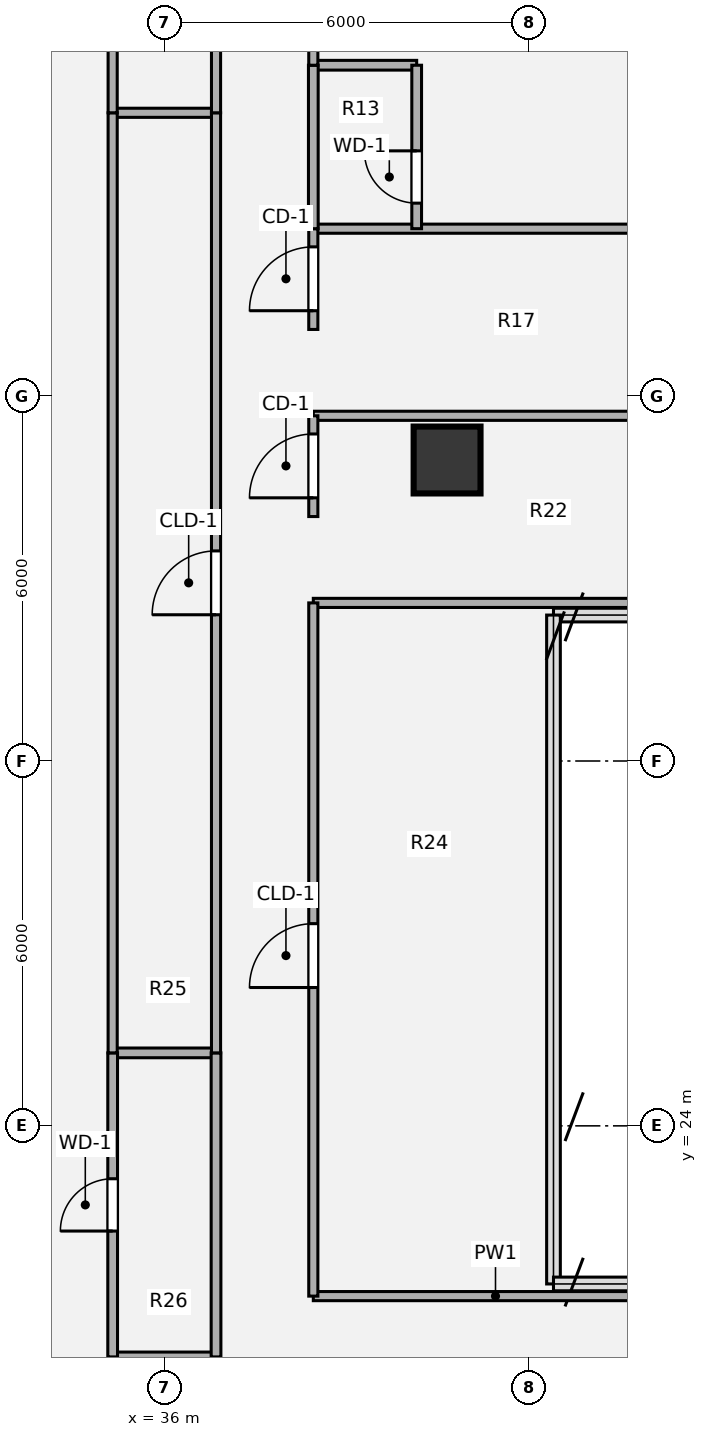
"""IFC4 building model, lengths in metres.
Left out: names, types, materials, properties, quantities, classifications, styles, units other than length and angle.
Written with IfcOpenShell. Run it as: python <this file> out.ifc"""

import sys

from ifc_helpers import new_model, si_unit, direction, frame, frame_2d, origin, origin_2d, place, context, subcontext, project, spatial, rectangle, hollow_circle, extrude, source, transform, mapped, element, fill, save


model = new_model("IFC4")
c1 = context("Model", 3, precision=1e-05, world=origin(), true_north=direction((0.0, 1.0)))
c2 = subcontext(c1, "Body", "Model", "MODEL_VIEW")
j1 = project(units=[si_unit("LENGTHUNIT", "METRE"), si_unit("PLANEANGLEUNIT", "RADIAN")], contexts=[c1])
p1 = place(None, origin())
s1 = spatial("IfcSite", under=j1, at=p1, CompositionType="ELEMENT")
p2 = place(p1, origin())
s2 = spatial("IfcBuilding", under=s1, at=p2, CompositionType="ELEMENT")
p3 = place(p2, frame((0.0, 0.0, 171.54)))
s3 = spatial("IfcBuildingStorey", under=s2, at=p3, CompositionType="ELEMENT", Elevation=171.54)
m1 = source(origin(), c2, "Body", "SweptSolid", [
    extrude(hollow_circle(Radius=0.55, WallThickness=0.04, at=origin_2d()), origin(), (0.0, 0.0, 1.0), 3.78),
])
p4 = place(p3, frame((40.65, 34.95, 0.0), z_axis=(0.0, 0.0, 1.0), x_axis=(1.0, 0.0, 0.0)))
e1 = element("IfcColumn", 1, at=p4, inside=s3, PredefinedType="COLUMN", context=c2, shape_type="MappedRepresentation", body=[
    mapped(m1, transform((0.0, 0.0, 0.0), x_axis=(1.0, 0.0, 0.0), y_axis=(0.0, 1.0, 0.0), z_axis=(0.0, 0.0, 1.0), scale=1.0)),
])
p5 = place(p3, frame((35.15, 20.2, 0.0), z_axis=(0.0, 0.0, 1.0), x_axis=(1.0, 0.0, 0.0)))
e2 = element("IfcWall", 2, at=p5, inside=s3, PredefinedType="PLUMBINGWALL", context=c2, shape_type="SweptSolid", body=[
    extrude(rectangle(XDim=1.7, YDim=0.16, at=frame_2d((0.85, 0.0))), origin(), (0.0, 0.0, 1.0), 3.5),
])
p6 = place(p3, frame((38.45, 21.2, 0.0), z_axis=(0.0, 0.0, 1.0), x_axis=(1.0, 0.0, 0.0)))
e3 = element("IfcWall", 3, at=p6, inside=s3, PredefinedType="PARTITIONING", context=c2, shape_type="SweptSolid", body=[
    extrude(rectangle(XDim=5.993, YDim=0.15, at=frame_2d((2.996, 0.0))), origin(), (0.0, 0.0, 1.0), 3.5),
])
p7 = place(p3, frame((35.15, 25.2, 0.0), z_axis=(0.0, 0.0, 1.0), x_axis=(1.0, 0.0, 0.0)))
e4 = element("IfcWall", 4, at=p7, inside=s3, PredefinedType="PLUMBINGWALL", context=c2, shape_type="SweptSolid", body=[
    extrude(rectangle(XDim=1.7, YDim=0.16, at=frame_2d((0.85, 0.0))), origin(), (0.0, 0.0, 1.0), 3.5),
])
p8 = place(p3, frame((38.45, 32.6, 0.0), z_axis=(0.0, 0.0, 1.0), x_axis=(1.0, 0.0, 0.0)))
e5 = element("IfcWall", 5, at=p8, inside=s3, PredefinedType="PARTITIONING", context=c2, shape_type="SweptSolid", body=[
    extrude(rectangle(XDim=5.993, YDim=0.15, at=frame_2d((2.997, 0.0))), origin(), (0.0, 0.0, 1.0), 3.5),
])
for number, where, z_axis, x_axis in (
    (6, (38.45, 35.677, 0.0), (0.0, 0.0, 1.0), (1.0, 0.0, 0.0)),
    (7, (38.45, 38.754, 0.0), (0.0, 0.0, 1.0), (1.0, 0.0, 0.0)),
):
    element("IfcWall", number, at=place(p3, frame(where, z_axis=z_axis, x_axis=x_axis)), inside=s3, PredefinedType="PARTITIONING", context=c2, shape_type="SweptSolid", body=[
        extrude(rectangle(XDim=6.2, YDim=0.15, at=frame_2d((3.1, 0.0))), origin(), (0.0, 0.0, 1.0), 2.982),
    ])
p9 = place(p3, frame((35.15, 40.66, 0.0), z_axis=(0.0, 0.0, 1.0), x_axis=(1.0, 0.0, 0.0)))
e8 = element("IfcWall", 8, at=p9, inside=s3, PredefinedType="PARTITIONING", context=c2, shape_type="SweptSolid", body=[
    extrude(rectangle(XDim=1.7, YDim=0.15, at=frame_2d((0.85, 0.0))), origin(), (0.0, 0.0, 1.0), 3.259),
])
p10 = place(p3, frame((38.45, 41.442, 0.0), z_axis=(0.0, 0.0, 1.0), x_axis=(1.0, 0.0, 0.0)))
e9 = element("IfcWall", 9, at=p10, inside=s3, PredefinedType="PLUMBINGWALL", context=c2, shape_type="SweptSolid", body=[
    extrude(rectangle(XDim=1.7, YDim=0.16, at=frame_2d((0.85, 0.0))), origin(), (0.0, 0.0, 1.0), 3.259),
])
p11 = place(p3, frame((35.15, 20.2, 0.0), z_axis=(0.0, 0.0, 1.0), x_axis=(0.0, 1.0, 0.0)))
e10 = element("IfcWall", 10, at=p11, inside=s3, PredefinedType="PLUMBINGWALL", context=c2, shape_type="SweptSolid", body=[
    extrude(rectangle(XDim=5.0, YDim=0.16, at=frame_2d((2.5, 0.0))), origin(), (0.0, 0.0, 1.0), 3.5),
])
p12 = place(p11, frame((2.07, 0.0, 0.0)))
e11 = element("IfcOpeningElement", 11, at=p12, cuts=e10, PredefinedType="OPENING", context=c2, shape_type="SweptSolid", body=[
    extrude(rectangle(XDim=0.86, YDim=2.1, at=origin_2d()), frame((0.43, 0.09, 1.05), z_axis=(0.0, -1.0, 0.0), x_axis=(1.0, 0.0, 0.0)), (0.0, 0.0, 1.0), 0.18),
])
p13 = place(p3, frame((35.15, 25.2, 0.0), z_axis=(0.0, 0.0, 1.0), x_axis=(0.0, 1.0, 0.0)))
e12 = element("IfcWall", 12, at=p13, inside=s3, PredefinedType="PARTITIONING", context=c2, shape_type="SweptSolid", body=[
    extrude(rectangle(XDim=15.46, YDim=0.15, at=frame_2d((7.73, 0.0))), origin(), (0.0, 0.0, 1.0), 3.5),
])
p14 = place(p3, frame((35.15, 40.66, 0.0), z_axis=(0.0, 0.0, 1.0), x_axis=(0.0, 1.0, 0.0)))
e13 = element("IfcWall", 13, at=p14, inside=s3, PredefinedType="PARTITIONING", context=c2, shape_type="SweptSolid", body=[
    extrude(rectangle(XDim=10.54, YDim=0.15, at=frame_2d((5.27, 0.0))), origin(), (0.0, 0.0, 1.0), 3.5),
])
p15 = place(p14, frame((4.81, 0.0, 0.0)))
e14 = element("IfcOpeningElement", 14, at=p15, cuts=e13, PredefinedType="OPENING", context=c2, shape_type="SweptSolid", body=[
    extrude(rectangle(XDim=0.86, YDim=2.1, at=origin_2d()), frame((0.43, 0.085, 1.05), z_axis=(0.0, -1.0, 0.0), x_axis=(1.0, 0.0, 0.0)), (0.0, 0.0, 1.0), 0.17),
])
p16 = place(p3, frame((36.85, 20.2, 0.0), z_axis=(0.0, 0.0, 1.0), x_axis=(0.0, 1.0, 0.0)))
e15 = element("IfcWall", 15, at=p16, inside=s3, PredefinedType="PLUMBINGWALL", context=c2, shape_type="SweptSolid", body=[
    extrude(rectangle(XDim=5.0, YDim=0.16, at=frame_2d((2.5, 0.0))), origin(), (0.0, 0.0, 1.0), 3.5),
])
p17 = place(p3, frame((36.85, 25.2, 0.0), z_axis=(0.0, 0.0, 1.0), x_axis=(0.0, 1.0, 0.0)))
e16 = element("IfcWall", 16, at=p17, inside=s3, PredefinedType="PARTITIONING", context=c2, shape_type="SweptSolid", body=[
    extrude(rectangle(XDim=15.46, YDim=0.15, at=frame_2d((7.73, 0.0))), origin(), (0.0, 0.0, 1.0), 3.5),
])
p18 = place(p17, frame((7.205, 0.0, 0.0)))
e17 = element("IfcOpeningElement", 17, at=p18, cuts=e16, PredefinedType="OPENING", context=c2, shape_type="SweptSolid", body=[
    extrude(rectangle(XDim=1.05, YDim=2.1, at=origin_2d()), frame((0.525, 0.085, 1.05), z_axis=(0.0, -1.0, 0.0), x_axis=(1.0, 0.0, 0.0)), (0.0, 0.0, 1.0), 0.17),
])
p19 = place(p3, frame((36.85, 40.66, 0.0), z_axis=(0.0, 0.0, 1.0), x_axis=(0.0, 1.0, 0.0)))
e18 = element("IfcWall", 18, at=p19, inside=s3, PredefinedType="PARTITIONING", context=c2, shape_type="SweptSolid", body=[
    extrude(rectangle(XDim=10.54, YDim=0.15, at=frame_2d((5.27, 0.0))), origin(), (0.0, 0.0, 1.0), 3.5),
])
p20 = place(p3, frame((38.45, 21.2, 0.0), z_axis=(0.0, 0.0, 1.0), x_axis=(0.0, 1.0, 0.0)))
e19 = element("IfcWall", 19, at=p20, inside=s3, PredefinedType="PARTITIONING", context=c2, shape_type="SweptSolid", body=[
    extrude(rectangle(XDim=11.4, YDim=0.15, at=frame_2d((5.7, 0.0))), origin(), (0.0, 0.0, 1.0), 3.5),
])
p21 = place(p20, frame((5.075, 0.0, 0.0)))
e20 = element("IfcOpeningElement", 20, at=p21, cuts=e19, PredefinedType="OPENING", context=c2, shape_type="SweptSolid", body=[
    extrude(rectangle(XDim=1.05, YDim=2.1, at=origin_2d()), frame((0.525, 0.085, 1.05), z_axis=(0.0, -1.0, 0.0), x_axis=(1.0, 0.0, 0.0)), (0.0, 0.0, 1.0), 0.17),
])
p22 = place(p3, frame((38.45, 34.02, 0.0), z_axis=(0.0, 0.0, 1.0), x_axis=(0.0, 1.0, 0.0)))
e21 = element("IfcWall", 21, at=p22, inside=s3, PredefinedType="PARTITIONING", context=c2, shape_type="SweptSolid", body=[
    extrude(rectangle(XDim=1.657, YDim=0.15, at=frame_2d((0.829, 0.0))), origin(), (0.0, 0.0, 1.0), 3.5),
])
p23 = place(p22, frame((0.308, 0.0, 0.0)))
e22 = element("IfcOpeningElement", 22, at=p23, cuts=e21, PredefinedType="OPENING", context=c2, shape_type="SweptSolid", body=[
    extrude(rectangle(XDim=1.05, YDim=2.1, at=origin_2d()), frame((0.525, 0.085, 1.05), z_axis=(0.0, -1.0, 0.0), x_axis=(1.0, 0.0, 0.0)), (0.0, 0.0, 1.0), 0.17),
])
p24 = place(p3, frame((38.45, 37.097, 0.0), z_axis=(0.0, 0.0, 1.0), x_axis=(0.0, 1.0, 0.0)))
e23 = element("IfcWall", 23, at=p24, inside=s3, PredefinedType="PARTITIONING", context=c2, shape_type="SweptSolid", body=[
    extrude(rectangle(XDim=1.657, YDim=0.15, at=frame_2d((0.829, 0.0))), origin(), (0.0, 0.0, 1.0), 3.5),
])
p25 = place(p24, frame((0.308, 0.0, 0.0)))
e24 = element("IfcOpeningElement", 24, at=p25, cuts=e23, PredefinedType="OPENING", context=c2, shape_type="SweptSolid", body=[
    extrude(rectangle(XDim=1.05, YDim=2.1, at=origin_2d()), frame((0.525, 0.085, 1.05), z_axis=(0.0, -1.0, 0.0), x_axis=(1.0, 0.0, 0.0)), (0.0, 0.0, 1.0), 0.17),
])
p26 = place(p3, frame((38.45, 38.754, 0.0), z_axis=(0.0, 0.0, 1.0), x_axis=(0.0, 1.0, 0.0)))
e25 = element("IfcWall", 25, at=p26, inside=s3, PredefinedType="PLUMBINGWALL", context=c2, shape_type="SweptSolid", body=[
    extrude(rectangle(XDim=2.688, YDim=0.16, at=frame_2d((1.344, 0.0))), origin(), (0.0, 0.0, 1.0), 3.5),
])
p27 = place(p3, frame((38.45, 41.442, 0.0), z_axis=(0.0, 0.0, 1.0), x_axis=(0.0, 1.0, 0.0)))
e26 = element("IfcWall", 26, at=p27, inside=s3, PredefinedType="PARTITIONING", context=c2, shape_type="SweptSolid", body=[
    extrude(rectangle(XDim=3.285, YDim=0.15, at=frame_2d((1.643, 0.0))), origin(), (0.0, 0.0, 1.0), 3.5),
])
p28 = place(p27, frame((1.122, 0.0, 0.0)))
e27 = element("IfcOpeningElement", 27, at=p28, cuts=e26, PredefinedType="OPENING", context=c2, shape_type="SweptSolid", body=[
    extrude(rectangle(XDim=1.05, YDim=2.1, at=origin_2d()), frame((0.525, 0.085, 1.05), z_axis=(0.0, -1.0, 0.0), x_axis=(1.0, 0.0, 0.0)), (0.0, 0.0, 1.0), 0.17),
])
p29 = place(p3, frame((40.15, 38.754, 0.0), z_axis=(0.0, 0.0, 1.0), x_axis=(0.0, 1.0, 0.0)))
e28 = element("IfcWall", 28, at=p29, inside=s3, PredefinedType="PLUMBINGWALL", context=c2, shape_type="SweptSolid", body=[
    extrude(rectangle(XDim=2.688, YDim=0.16, at=frame_2d((1.344, 0.0))), origin(), (0.0, 0.0, 1.0), 3.5),
])
p30 = place(p29, frame((0.42, 0.0, 0.0)))
e29 = element("IfcOpeningElement", 29, at=p30, cuts=e28, PredefinedType="OPENING", context=c2, shape_type="SweptSolid", body=[
    extrude(rectangle(XDim=0.86, YDim=2.1, at=origin_2d()), frame((0.43, 0.09, 1.05), z_axis=(0.0, -1.0, 0.0), x_axis=(1.0, 0.0, 0.0)), (0.0, 0.0, 1.0), 0.18),
])
m2 = source(origin(), c2, "Body", "SweptSolid", [
    extrude(rectangle(XDim=0.86, YDim=2.1, at=origin_2d()), frame((0.43, 0.025, 1.05), z_axis=(0.0, -1.0, 0.0), x_axis=(1.0, 0.0, 0.0)), (0.0, 0.0, 1.0), 0.05),
])
p31 = place(p12, origin())
e30 = element("IfcDoor", 30, at=p31, inside=s3, OperationType="SINGLE_SWING_LEFT", PredefinedType="DOOR", context=c2, shape_type="MappedRepresentation", body=[
    mapped(m2, transform((0.0, 0.0, 0.0), x_axis=(1.0, 0.0, 0.0), y_axis=(0.0, 1.0, 0.0), z_axis=(0.0, 0.0, 1.0), scale=1.0)),
])
fill(e11, e30)
m3 = source(origin(), c2, "Body", "SweptSolid", [
    extrude(rectangle(XDim=1.05, YDim=2.1, at=origin_2d()), frame((0.525, 0.025, 1.05), z_axis=(0.0, -1.0, 0.0), x_axis=(1.0, 0.0, 0.0)), (0.0, 0.0, 1.0), 0.05),
])
p32 = place(p18, origin())
e31 = element("IfcDoor", 31, at=p32, inside=s3, OperationType="SINGLE_SWING_LEFT", PredefinedType="DOOR", context=c2, shape_type="MappedRepresentation", body=[
    mapped(m3, transform((0.0, 0.0, 0.0), x_axis=(1.0, 0.0, 0.0), y_axis=(0.0, 1.0, 0.0), z_axis=(0.0, 0.0, 1.0), scale=1.0)),
])
fill(e17, e31)
p33 = place(p21, origin())
e32 = element("IfcDoor", 32, at=p33, inside=s3, OperationType="SINGLE_SWING_LEFT", PredefinedType="DOOR", context=c2, shape_type="MappedRepresentation", body=[
    mapped(m3, transform((0.0, 0.0, 0.0), x_axis=(1.0, 0.0, 0.0), y_axis=(0.0, 1.0, 0.0), z_axis=(0.0, 0.0, 1.0), scale=1.0)),
])
fill(e20, e32)
m4 = source(origin(), c2, "Body", "SweptSolid", [
    extrude(rectangle(XDim=1.05, YDim=2.1, at=origin_2d()), frame((0.525, 0.025, 1.05), z_axis=(0.0, -1.0, 0.0), x_axis=(1.0, 0.0, 0.0)), (0.0, 0.0, 1.0), 0.05),
])
p34 = place(p23, origin())
e33 = element("IfcDoor", 33, at=p34, inside=s3, OperationType="SINGLE_SWING_LEFT", PredefinedType="DOOR", context=c2, shape_type="MappedRepresentation", body=[
    mapped(m4, transform((0.0, 0.0, 0.0), x_axis=(1.0, 0.0, 0.0), y_axis=(0.0, 1.0, 0.0), z_axis=(0.0, 0.0, 1.0), scale=1.0)),
])
fill(e22, e33)
p35 = place(p25, origin())
e34 = element("IfcDoor", 34, at=p35, inside=s3, OperationType="SINGLE_SWING_LEFT", PredefinedType="DOOR", context=c2, shape_type="MappedRepresentation", body=[
    mapped(m4, transform((0.0, 0.0, 0.0), x_axis=(1.0, 0.0, 0.0), y_axis=(0.0, 1.0, 0.0), z_axis=(0.0, 0.0, 1.0), scale=1.0)),
])
fill(e24, e34)
p36 = place(p30, origin())
e35 = element("IfcDoor", 35, at=p36, inside=s3, OperationType="SINGLE_SWING_RIGHT", PredefinedType="DOOR", context=c2, shape_type="MappedRepresentation", body=[
    mapped(m2, transform((0.0, 0.0, 0.0), x_axis=(1.0, 0.0, 0.0), y_axis=(0.0, 1.0, 0.0), z_axis=(0.0, 0.0, 1.0), scale=1.0)),
])
fill(e29, e35)
save(model, sys.argv[1])
